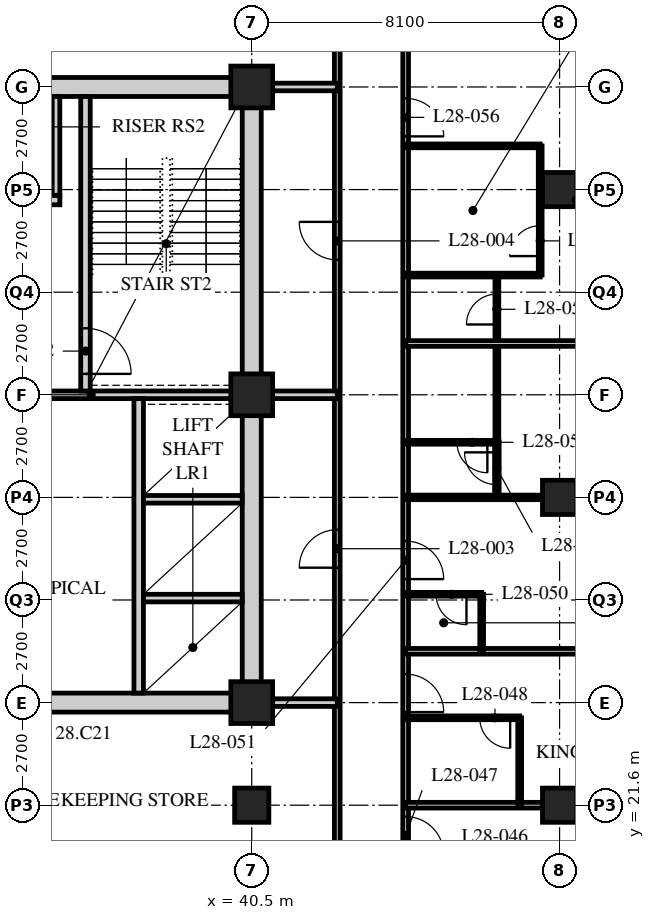
"""IFC4 building model, lengths in metres.
Left out: names, types, materials, properties, quantities, classifications, styles, units other than length and angle.
Written with IfcOpenShell. Run it as: python <this file> out.ifc"""

import sys

from ifc_helpers import new_model, si_unit, direction, frame, frame_2d, origin, origin_2d, place, context, subcontext, project, spatial, rectangle, hollow_rectangle, extrude, element, fill, save


model = new_model("IFC4")
c1 = context("Model", 3, precision=1e-05, world=origin(), true_north=direction((0.0, 1.0)))
c2 = subcontext(c1, "Body", "Model", "MODEL_VIEW")
j1 = project(units=[si_unit("LENGTHUNIT", "METRE"), si_unit("PLANEANGLEUNIT", "RADIAN")], contexts=[c1])
p1 = place(None, origin())
s1 = spatial("IfcSite", under=j1, at=p1, CompositionType="ELEMENT")
p2 = place(p1, origin())
s2 = spatial("IfcBuilding", under=s1, at=p2, CompositionType="ELEMENT")
p3 = place(p2, frame((0.0, 0.0, 113.6)))
s3 = spatial("IfcBuildingStorey", under=s2, at=p3, CompositionType="ELEMENT", Elevation=113.6)
p4 = place(p3, frame((40.5, 21.6, 0.0), z_axis=(0.0, 0.0, 1.0), x_axis=(1.0, 0.0, 0.0)))
e1 = element("IfcColumn", 1, at=p4, inside=s3, PredefinedType="COLUMN", context=c2, shape_type="SweptSolid", body=[
    extrude(hollow_rectangle(XDim=0.9, YDim=0.9, WallThickness=0.09, at=origin_2d()), origin(), (0.0, 0.0, 1.0), 3.4),
])
for number, where, z_axis, x_axis in (
    (2, (40.5, 24.3, 0.0), (0.0, 0.0, 1.0), (1.0, 0.0, 0.0)),
    (3, (40.5, 32.4, 0.0), (0.0, 0.0, 1.0), (1.0, 0.0, 0.0)),
    (4, (40.5, 40.5, 0.0), (0.0, 0.0, 1.0), (1.0, 0.0, 0.0)),
):
    element("IfcColumn", number, at=place(p3, frame(where, z_axis=z_axis, x_axis=x_axis)), inside=s3, PredefinedType="COLUMN", context=c2, shape_type="SweptSolid", body=[
        extrude(hollow_rectangle(XDim=1.1, YDim=1.1, WallThickness=0.1, at=origin_2d()), origin(), (0.0, 0.0, 1.0), 3.4),
    ])
for number, where, z_axis, x_axis in (
    (5, (48.6, 21.6, 0.0), (0.0, 0.0, 1.0), (1.0, 0.0, 0.0)),
    (6, (48.6, 29.7, 0.0), (0.0, 0.0, 1.0), (1.0, 0.0, 0.0)),
    (7, (48.6, 37.8, 0.0), (0.0, 0.0, 1.0), (1.0, 0.0, 0.0)),
):
    element("IfcColumn", number, at=place(p3, frame(where, z_axis=z_axis, x_axis=x_axis)), inside=s3, PredefinedType="COLUMN", context=c2, shape_type="SweptSolid", body=[
        extrude(hollow_rectangle(XDim=0.9, YDim=0.9, WallThickness=0.09, at=origin_2d()), origin(), (0.0, 0.0, 1.0), 3.4),
    ])
p5 = place(p3, frame((44.55, 17.55, 0.0), z_axis=(0.0, 0.0, 1.0), x_axis=(0.0, 1.0, 0.0)))
e8 = element("IfcWall", 8, at=p5, inside=s3, PredefinedType="PARTITIONING", context=c2, shape_type="SweptSolid", body=[
    extrude(rectangle(XDim=28.35, YDim=0.15, at=frame_2d((14.175, 0.0))), origin(), (0.0, 0.0, 1.0), 3.19),
])
p6 = place(p5, frame((2.75, 0.0, 0.0)))
e9 = element("IfcOpeningElement", 9, at=p6, cuts=e8, PredefinedType="OPENING", context=c2, shape_type="SweptSolid", body=[
    extrude(rectangle(XDim=1.0, YDim=2.1, at=frame_2d((0.5, 1.05))), frame((0.0, 0.085, 0.0), z_axis=(0.0, -1.0, 0.0), x_axis=(1.0, 0.0, 0.0)), (0.0, 0.0, 1.0), 0.17),
])
p7 = place(p5, frame((6.5, 0.0, 0.0)))
e10 = element("IfcOpeningElement", 10, at=p7, cuts=e8, PredefinedType="OPENING", context=c2, shape_type="SweptSolid", body=[
    extrude(rectangle(XDim=1.0, YDim=2.1, at=frame_2d((0.5, 1.05))), frame((0.0, 0.085, 0.0), z_axis=(0.0, -1.0, 0.0), x_axis=(1.0, 0.0, 0.0)), (0.0, 0.0, 1.0), 0.17),
])
p8 = place(p5, frame((10.0, 0.0, 0.0)))
e11 = element("IfcOpeningElement", 11, at=p8, cuts=e8, PredefinedType="OPENING", context=c2, shape_type="SweptSolid", body=[
    extrude(rectangle(XDim=1.0, YDim=2.1, at=frame_2d((0.5, 1.05))), frame((0.0, 0.085, 0.0), z_axis=(0.0, -1.0, 0.0), x_axis=(1.0, 0.0, 0.0)), (0.0, 0.0, 1.0), 0.17),
])
p9 = place(p5, frame((21.65, 0.0, 0.0)))
e12 = element("IfcOpeningElement", 12, at=p9, cuts=e8, PredefinedType="OPENING", context=c2, shape_type="SweptSolid", body=[
    extrude(rectangle(XDim=1.0, YDim=2.1, at=frame_2d((0.5, 1.05))), frame((0.0, 0.085, 0.0), z_axis=(0.0, -1.0, 0.0), x_axis=(1.0, 0.0, 0.0)), (0.0, 0.0, 1.0), 0.17),
])
p10 = place(p5, frame((26.75, 0.0, 0.0)))
e13 = element("IfcOpeningElement", 13, at=p10, cuts=e8, PredefinedType="OPENING", context=c2, shape_type="SweptSolid", body=[
    extrude(rectangle(XDim=1.0, YDim=2.1, at=frame_2d((0.5, 1.05))), frame((0.0, 0.085, 0.0), z_axis=(0.0, -1.0, 0.0), x_axis=(1.0, 0.0, 0.0)), (0.0, 0.0, 1.0), 0.17),
])
p11 = place(p3, frame((42.75, 19.35, 0.0), z_axis=(0.0, 0.0, 1.0), x_axis=(0.0, 1.0, 0.0)))
e14 = element("IfcWall", 14, at=p11, inside=s3, PredefinedType="PARTITIONING", context=c2, shape_type="SweptSolid", body=[
    extrude(rectangle(XDim=24.75, YDim=0.15, at=frame_2d((12.375, 0.0))), origin(), (0.0, 0.0, 1.0), 3.19),
])
p12 = place(p11, frame((8.5, 0.0, 0.0)))
e15 = element("IfcOpeningElement", 15, at=p12, cuts=e14, PredefinedType="OPENING", context=c2, shape_type="SweptSolid", body=[
    extrude(rectangle(XDim=1.0, YDim=2.1, at=frame_2d((0.5, 1.05))), frame((0.0, 0.085, 0.0), z_axis=(0.0, -1.0, 0.0), x_axis=(1.0, 0.0, 0.0)), (0.0, 0.0, 1.0), 0.17),
])
p13 = place(p11, frame((16.6, 0.0, 0.0)))
e16 = element("IfcOpeningElement", 16, at=p13, cuts=e14, PredefinedType="OPENING", context=c2, shape_type="SweptSolid", body=[
    extrude(rectangle(XDim=1.0, YDim=2.1, at=frame_2d((0.5, 1.05))), frame((0.0, 0.085, 0.0), z_axis=(0.0, -1.0, 0.0), x_axis=(1.0, 0.0, 0.0)), (0.0, 0.0, 1.0), 0.17),
])
for number, where, z_axis, x_axis in (
    (17, (40.5, 32.4, 0.0), (0.0, 0.0, 1.0), (1.0, 0.0, 0.0)),
    (18, (40.5, 24.3, 0.0), (0.0, 0.0, 1.0), (1.0, 0.0, 0.0)),
    (19, (40.5, 40.5, 0.0), (0.0, 0.0, 1.0), (1.0, 0.0, 0.0)),
):
    element("IfcWall", number, at=place(p3, frame(where, z_axis=z_axis, x_axis=x_axis)), inside=s3, PredefinedType="SOLIDWALL", context=c2, shape_type="SweptSolid", body=[
        extrude(rectangle(XDim=2.25, YDim=0.2, at=frame_2d((1.125, 0.0))), origin(), (0.0, 0.0, 1.0), 3.19),
    ])
p14 = place(p3, frame((44.55, 21.6, 0.0), z_axis=(0.0, 0.0, 1.0), x_axis=(1.0, 0.0, 0.0)))
e20 = element("IfcWall", 20, at=p14, inside=s3, PredefinedType="PARTITIONING", context=c2, shape_type="SweptSolid", body=[
    extrude(rectangle(XDim=11.85, YDim=0.15, at=frame_2d((5.925, 0.0))), origin(), (0.0, 0.0, 1.0), 2.578),
])
p15 = place(p3, frame((47.55, 21.6, 0.0), z_axis=(0.0, 0.0, 1.0), x_axis=(0.0, 1.0, 0.0)))
e21 = element("IfcWall", 21, at=p15, inside=s3, PredefinedType="PARTITIONING", context=c2, shape_type="SweptSolid", body=[
    extrude(rectangle(XDim=2.3, YDim=0.1, at=frame_2d((1.15, 0.0))), origin(), (0.0, 0.0, 1.0), 3.19),
])
p16 = place(p3, frame((44.55, 23.9, 0.0), z_axis=(0.0, 0.0, 1.0), x_axis=(1.0, 0.0, 0.0)))
e22 = element("IfcWall", 22, at=p16, inside=s3, PredefinedType="PARTITIONING", context=c2, shape_type="SweptSolid", body=[
    extrude(rectangle(XDim=3.0, YDim=0.1, at=frame_2d((1.5, 0.0))), origin(), (0.0, 0.0, 1.0), 3.19),
])
p17 = place(p16, frame((1.95, 0.0, 0.0)))
e23 = element("IfcOpeningElement", 23, at=p17, cuts=e22, PredefinedType="OPENING", context=c2, shape_type="SweptSolid", body=[
    extrude(rectangle(XDim=0.8, YDim=2.1, at=frame_2d((0.4, 1.05))), frame((0.0, 0.06, 0.0), z_axis=(0.0, -1.0, 0.0), x_axis=(1.0, 0.0, 0.0)), (0.0, 0.0, 1.0), 0.12),
])
p18 = place(p3, frame((44.55, 25.65, 0.0), z_axis=(0.0, 0.0, 1.0), x_axis=(1.0, 0.0, 0.0)))
e24 = element("IfcWall", 24, at=p18, inside=s3, PredefinedType="PARTITIONING", context=c2, shape_type="SweptSolid", body=[
    extrude(rectangle(XDim=11.85, YDim=0.15, at=frame_2d((5.925, 0.0))), origin(), (0.0, 0.0, 1.0), 3.19),
])
p19 = place(p3, frame((46.55, 25.65, 0.0), z_axis=(0.0, 0.0, 1.0), x_axis=(0.0, 1.0, 0.0)))
e25 = element("IfcWall", 25, at=p19, inside=s3, PredefinedType="PARTITIONING", context=c2, shape_type="SweptSolid", body=[
    extrude(rectangle(XDim=1.5, YDim=0.1, at=frame_2d((0.75, 0.0))), origin(), (0.0, 0.0, 1.0), 3.19),
])
p20 = place(p3, frame((44.55, 27.15, 0.0), z_axis=(0.0, 0.0, 1.0), x_axis=(1.0, 0.0, 0.0)))
e26 = element("IfcWall", 26, at=p20, inside=s3, PredefinedType="PARTITIONING", context=c2, shape_type="SweptSolid", body=[
    extrude(rectangle(XDim=2.0, YDim=0.1, at=frame_2d((1.0, 0.0))), origin(), (0.0, 0.0, 1.0), 3.19),
])
p21 = place(p20, frame((0.8, 0.0, 0.0)))
e27 = element("IfcOpeningElement", 27, at=p21, cuts=e26, PredefinedType="OPENING", context=c2, shape_type="SweptSolid", body=[
    extrude(rectangle(XDim=0.8, YDim=2.1, at=frame_2d((0.4, 1.05))), frame((0.0, 0.06, 0.0), z_axis=(0.0, -1.0, 0.0), x_axis=(1.0, 0.0, 0.0)), (0.0, 0.0, 1.0), 0.12),
])
p22 = place(p3, frame((46.95, 31.15, 0.0), z_axis=(0.0, 0.0, 1.0), x_axis=(0.0, 1.0, 0.0)))
e28 = element("IfcWall", 28, at=p22, inside=s3, PredefinedType="PARTITIONING", context=c2, shape_type="SweptSolid", body=[
    extrude(rectangle(XDim=4.4, YDim=0.1, at=frame_2d((2.2, 0.0))), origin(), (0.0, 0.0, 1.0), 3.19),
])
p23 = place(p22, frame((3.1, 0.0, 0.0)))
e29 = element("IfcOpeningElement", 29, at=p23, cuts=e28, PredefinedType="OPENING", context=c2, shape_type="SweptSolid", body=[
    extrude(rectangle(XDim=0.8, YDim=2.1, at=frame_2d((0.4, 1.05))), frame((0.0, 0.06, 0.0), z_axis=(0.0, -1.0, 0.0), x_axis=(1.0, 0.0, 0.0)), (0.0, 0.0, 1.0), 0.12),
])
p24 = place(p3, frame((44.55, 31.15, 0.0), z_axis=(0.0, 0.0, 1.0), x_axis=(1.0, 0.0, 0.0)))
e30 = element("IfcWall", 30, at=p24, inside=s3, PredefinedType="PARTITIONING", context=c2, shape_type="SweptSolid", body=[
    extrude(rectangle(XDim=2.4, YDim=0.1, at=frame_2d((1.2, 0.0))), origin(), (0.0, 0.0, 1.0), 3.19),
])
p25 = place(p24, frame((1.35, 0.0, 0.0)))
e31 = element("IfcOpeningElement", 31, at=p25, cuts=e30, PredefinedType="OPENING", context=c2, shape_type="SweptSolid", body=[
    extrude(rectangle(XDim=0.8, YDim=2.1, at=frame_2d((0.4, 1.05))), frame((0.0, 0.06, 0.0), z_axis=(0.0, -1.0, 0.0), x_axis=(1.0, 0.0, 0.0)), (0.0, 0.0, 1.0), 0.12),
])
p26 = place(p3, frame((44.55, 29.7, 0.0), z_axis=(0.0, 0.0, 1.0), x_axis=(1.0, 0.0, 0.0)))
e32 = element("IfcWall", 32, at=p26, inside=s3, PredefinedType="PARTITIONING", context=c2, shape_type="SweptSolid", body=[
    extrude(rectangle(XDim=11.85, YDim=0.12, at=frame_2d((5.925, 0.0))), origin(), (0.0, 0.0, 1.0), 2.578),
])
p27 = place(p26, frame((6.85, 0.0, 0.0)))
e33 = element("IfcOpeningElement", 33, at=p27, cuts=e32, PredefinedType="OPENING", context=c2, shape_type="SweptSolid", body=[
    extrude(rectangle(XDim=0.85, YDim=2.1, at=frame_2d((0.425, 1.05))), frame((0.0, 0.07, 0.0), z_axis=(0.0, -1.0, 0.0), x_axis=(1.0, 0.0, 0.0)), (0.0, 0.0, 1.0), 0.14),
])
p28 = place(p3, frame((44.55, 33.75, 0.0), z_axis=(0.0, 0.0, 1.0), x_axis=(1.0, 0.0, 0.0)))
e34 = element("IfcWall", 34, at=p28, inside=s3, PredefinedType="PARTITIONING", context=c2, shape_type="SweptSolid", body=[
    extrude(rectangle(XDim=11.85, YDim=0.15, at=frame_2d((5.925, 0.0))), origin(), (0.0, 0.0, 1.0), 3.19),
])
p29 = place(p3, frame((48.09, 35.55, 0.0), z_axis=(0.0, 0.0, 1.0), x_axis=(0.0, 1.0, 0.0)))
e35 = element("IfcWall", 35, at=p29, inside=s3, PredefinedType="PARTITIONING", context=c2, shape_type="SweptSolid", body=[
    extrude(rectangle(XDim=3.4, YDim=0.1, at=frame_2d((1.7, 0.0))), origin(), (0.0, 0.0, 1.0), 3.19),
])
p30 = place(p29, frame((0.5, 0.0, 0.0)))
e36 = element("IfcOpeningElement", 36, at=p30, cuts=e35, PredefinedType="OPENING", context=c2, shape_type="SweptSolid", body=[
    extrude(rectangle(XDim=0.8, YDim=2.1, at=frame_2d((0.4, 1.05))), frame((0.0, 0.06, 0.0), z_axis=(0.0, -1.0, 0.0), x_axis=(1.0, 0.0, 0.0)), (0.0, 0.0, 1.0), 0.12),
])
for number, where, z_axis, x_axis in (
    (37, (44.55, 35.55, 0.0), (0.0, 0.0, 1.0), (1.0, 0.0, 0.0)),
    (38, (44.55, 38.95, 0.0), (0.0, 0.0, 1.0), (1.0, 0.0, 0.0)),
):
    element("IfcWall", number, at=place(p3, frame(where, z_axis=z_axis, x_axis=x_axis)), inside=s3, PredefinedType="PARTITIONING", context=c2, shape_type="SweptSolid", body=[
        extrude(rectangle(XDim=3.54, YDim=0.1, at=frame_2d((1.77, 0.0))), origin(), (0.0, 0.0, 1.0), 3.19),
    ])
p31 = place(p3, frame((46.95, 31.16, 0.0), z_axis=(0.0, 0.0, 1.0), x_axis=(0.0, -1.0, 0.0)))
e39 = element("IfcWall", 39, at=p31, inside=s3, PredefinedType="PARTITIONING", context=c2, shape_type="SweptSolid", body=[
    extrude(rectangle(XDim=1.46, YDim=0.12, at=frame_2d((0.73, 0.0))), origin(), (0.0, 0.0, 1.0), 3.19),
])
p32 = place(p31, frame((0.275, 0.0, 0.0)))
e40 = element("IfcOpeningElement", 40, at=p32, cuts=e39, PredefinedType="OPENING", context=c2, shape_type="SweptSolid", body=[
    extrude(rectangle(XDim=0.85, YDim=2.1, at=frame_2d((0.425, 1.05))), frame((0.0, 0.07, 0.0), z_axis=(0.0, -1.0, 0.0), x_axis=(1.0, 0.0, 0.0)), (0.0, 0.0, 1.0), 0.14),
])
p33 = place(p3, frame((15.95, 24.3, 0.0), z_axis=(0.0, 0.0, 1.0), x_axis=(1.0, 0.0, 0.0)))
e41 = element("IfcWall", 41, at=p33, inside=s3, PredefinedType="SOLIDWALL", context=c2, shape_type="SweptSolid", body=[
    extrude(rectangle(XDim=24.8, YDim=0.5, at=frame_2d((12.4, 0.0))), origin(), (0.0, 0.0, 1.0), 2.54),
])
p34 = place(p33, frame((11.5, 0.0, 0.0)))
e42 = element("IfcOpeningElement", 42, at=p34, cuts=e41, PredefinedType="OPENING", context=c2, shape_type="SweptSolid", body=[
    extrude(rectangle(XDim=1.8, YDim=2.4, at=frame_2d((0.9, 1.2))), frame((0.0, 0.26, 0.0), z_axis=(0.0, -1.0, 0.0), x_axis=(1.0, 0.0, 0.0)), (0.0, 0.0, 1.0), 0.52),
])
p35 = place(p3, frame((15.95, 40.5, 0.0), z_axis=(0.0, 0.0, 1.0), x_axis=(1.0, 0.0, 0.0)))
e43 = element("IfcWall", 43, at=p35, inside=s3, PredefinedType="SOLIDWALL", context=c2, shape_type="SweptSolid", body=[
    extrude(rectangle(XDim=24.8, YDim=0.5, at=frame_2d((12.4, 0.0))), origin(), (0.0, 0.0, 1.0), 2.54),
])
p36 = place(p35, frame((11.5, 0.0, 0.0)))
e44 = element("IfcOpeningElement", 44, at=p36, cuts=e43, PredefinedType="OPENING", context=c2, shape_type="SweptSolid", body=[
    extrude(rectangle(XDim=1.8, YDim=2.4, at=frame_2d((0.9, 1.2))), frame((0.0, 0.26, 0.0), z_axis=(0.0, -1.0, 0.0), x_axis=(1.0, 0.0, 0.0)), (0.0, 0.0, 1.0), 0.52),
])
p37 = place(p3, frame((40.5, 24.55, 0.0), z_axis=(0.0, 0.0, 1.0), x_axis=(0.0, 1.0, 0.0)))
e45 = element("IfcWall", 45, at=p37, inside=s3, PredefinedType="SOLIDWALL", context=c2, shape_type="SweptSolid", body=[
    extrude(rectangle(XDim=15.7, YDim=0.5, at=frame_2d((7.85, 0.0))), origin(), (0.0, 0.0, 1.0), 2.578),
])
p38 = place(p3, frame((32.3, 32.4, 0.0), z_axis=(0.0, 0.0, 1.0), x_axis=(1.0, 0.0, 0.0)))
e46 = element("IfcWall", 46, at=p38, inside=s3, PredefinedType="SOLIDWALL", context=c2, shape_type="SweptSolid", body=[
    extrude(rectangle(XDim=7.95, YDim=0.2, at=frame_2d((3.975, 0.0))), origin(), (0.0, 0.0, 1.0), 2.578),
])
p39 = place(p3, frame((37.525, 24.55, 0.0), z_axis=(0.0, 0.0, 1.0), x_axis=(0.0, 1.0, 0.0)))
e47 = element("IfcWall", 47, at=p39, inside=s3, PredefinedType="SOLIDWALL", context=c2, shape_type="SweptSolid", body=[
    extrude(rectangle(XDim=7.75, YDim=0.25, at=frame_2d((3.875, 0.0))), origin(), (0.0, 0.0, 1.0), 3.19),
])
for number, where, z_axis, x_axis in (
    (48, (37.65, 27.05, 0.0), (0.0, 0.0, 1.0), (1.0, 0.0, 0.0)),
    (49, (37.65, 29.65, 0.0), (0.0, 0.0, 1.0), (1.0, 0.0, 0.0)),
):
    element("IfcWall", number, at=place(p3, frame(where, z_axis=z_axis, x_axis=x_axis)), inside=s3, PredefinedType="SOLIDWALL", context=c2, shape_type="SweptSolid", body=[
        extrude(rectangle(XDim=2.6, YDim=0.2, at=frame_2d((1.3, 0.0))), origin(), (0.0, 0.0, 1.0), 3.19),
    ])
p40 = place(p3, frame((36.125, 32.5, 0.0), z_axis=(0.0, 0.0, 1.0), x_axis=(0.0, 1.0, 0.0)))
e50 = element("IfcWall", 50, at=p40, inside=s3, PredefinedType="SOLIDWALL", context=c2, shape_type="SweptSolid", body=[
    extrude(rectangle(XDim=7.75, YDim=0.25, at=frame_2d((3.875, 0.0))), origin(), (0.0, 0.0, 1.0), 3.19),
])
p41 = place(p40, frame((0.45, 0.0, 0.0)))
e51 = element("IfcOpeningElement", 51, at=p41, cuts=e50, PredefinedType="OPENING", context=c2, shape_type="SweptSolid", body=[
    extrude(rectangle(XDim=1.2, YDim=2.1, at=frame_2d((0.6, 1.05))), frame((0.0, 0.135, 0.0), z_axis=(0.0, -1.0, 0.0), x_axis=(1.0, 0.0, 0.0)), (0.0, 0.0, 1.0), 0.27),
])
p42 = place(p3, frame((32.5, 37.525, 0.0), z_axis=(0.0, 0.0, 1.0), x_axis=(1.0, 0.0, 0.0)))
e52 = element("IfcWall", 52, at=p42, inside=s3, PredefinedType="SOLIDWALL", context=c2, shape_type="SweptSolid", body=[
    extrude(rectangle(XDim=2.95, YDim=0.25, at=frame_2d((1.475, 0.0))), origin(), (0.0, 0.0, 1.0), 3.19),
])
p43 = place(p42, frame((0.9, 0.0, 0.0)))
e53 = element("IfcOpeningElement", 53, at=p43, cuts=e52, PredefinedType="OPENING", context=c2, shape_type="SweptSolid", body=[
    extrude(rectangle(XDim=1.1, YDim=2.4, at=frame_2d((0.55, 1.2))), frame((0.0, 0.135, 0.0), z_axis=(0.0, -1.0, 0.0), x_axis=(1.0, 0.0, 0.0)), (0.0, 0.0, 1.0), 0.27),
])
p44 = place(p3, frame((35.35, 37.65, 0.0), z_axis=(0.0, 0.0, 1.0), x_axis=(0.0, 1.0, 0.0)))
e54 = element("IfcWall", 54, at=p44, inside=s3, PredefinedType="SOLIDWALL", context=c2, shape_type="SweptSolid", body=[
    extrude(rectangle(XDim=2.6, YDim=0.2, at=frame_2d((1.3, 0.0))), origin(), (0.0, 0.0, 1.0), 3.19),
])
p45 = place(p12, origin())
e55 = element("IfcDoor", 55, at=p45, inside=s3, OperationType="SINGLE_SWING_LEFT", PredefinedType="DOOR", context=c2, shape_type="SweptSolid", body=[
    extrude(rectangle(XDim=1.0, YDim=2.1, at=frame_2d((0.5, 1.05))), frame((0.0, 0.025, 0.0), z_axis=(0.0, -1.0, 0.0), x_axis=(1.0, 0.0, 0.0)), (0.0, 0.0, 1.0), 0.05),
])
fill(e15, e55)
p46 = place(p13, origin())
e56 = element("IfcDoor", 56, at=p46, inside=s3, OperationType="SINGLE_SWING_RIGHT", PredefinedType="DOOR", context=c2, shape_type="SweptSolid", body=[
    extrude(rectangle(XDim=1.0, YDim=2.1, at=frame_2d((0.5, 1.05))), frame((0.0, 0.025, 0.0), z_axis=(0.0, -1.0, 0.0), x_axis=(1.0, 0.0, 0.0)), (0.0, 0.0, 1.0), 0.05),
])
fill(e16, e56)
p47 = place(p6, origin())
e57 = element("IfcDoor", 57, at=p47, inside=s3, OperationType="SINGLE_SWING_RIGHT", PredefinedType="DOOR", context=c2, shape_type="SweptSolid", body=[
    extrude(rectangle(XDim=1.0, YDim=2.1, at=frame_2d((0.5, 1.05))), frame((0.0, 0.025, 0.0), z_axis=(0.0, -1.0, 0.0), x_axis=(1.0, 0.0, 0.0)), (0.0, 0.0, 1.0), 0.05),
])
fill(e9, e57)
p48 = place(p17, origin())
e58 = element("IfcDoor", 58, at=p48, inside=s3, OperationType="SINGLE_SWING_LEFT", PredefinedType="DOOR", context=c2, shape_type="SweptSolid", body=[
    extrude(rectangle(XDim=0.8, YDim=2.1, at=frame_2d((0.4, 1.05))), frame((0.0, 0.025, 0.0), z_axis=(0.0, -1.0, 0.0), x_axis=(1.0, 0.0, 0.0)), (0.0, 0.0, 1.0), 0.05),
])
fill(e23, e58)
p49 = place(p7, origin())
e59 = element("IfcDoor", 59, at=p49, inside=s3, OperationType="SINGLE_SWING_RIGHT", PredefinedType="DOOR", context=c2, shape_type="SweptSolid", body=[
    extrude(rectangle(XDim=1.0, YDim=2.1, at=frame_2d((0.5, 1.05))), frame((0.0, 0.025, 0.0), z_axis=(0.0, -1.0, 0.0), x_axis=(1.0, 0.0, 0.0)), (0.0, 0.0, 1.0), 0.05),
])
fill(e10, e59)
p50 = place(p21, origin())
e60 = element("IfcDoor", 60, at=p50, inside=s3, OperationType="SINGLE_SWING_LEFT", PredefinedType="DOOR", context=c2, shape_type="SweptSolid", body=[
    extrude(rectangle(XDim=0.8, YDim=2.1, at=frame_2d((0.4, 1.05))), frame((0.0, 0.025, 0.0), z_axis=(0.0, -1.0, 0.0), x_axis=(1.0, 0.0, 0.0)), (0.0, 0.0, 1.0), 0.05),
])
fill(e27, e60)
p51 = place(p8, origin())
e61 = element("IfcDoor", 61, at=p51, inside=s3, OperationType="SINGLE_SWING_RIGHT", PredefinedType="DOOR", context=c2, shape_type="SweptSolid", body=[
    extrude(rectangle(XDim=1.0, YDim=2.1, at=frame_2d((0.5, 1.05))), frame((0.0, 0.025, 0.0), z_axis=(0.0, -1.0, 0.0), x_axis=(1.0, 0.0, 0.0)), (0.0, 0.0, 1.0), 0.05),
])
fill(e11, e61)
p52 = place(p25, origin())
e62 = element("IfcDoor", 62, at=p52, inside=s3, OperationType="SINGLE_SWING_LEFT", PredefinedType="DOOR", context=c2, shape_type="SweptSolid", body=[
    extrude(rectangle(XDim=0.8, YDim=2.1, at=frame_2d((0.4, 1.05))), frame((0.0, 0.025, 0.0), z_axis=(0.0, -1.0, 0.0), x_axis=(1.0, 0.0, 0.0)), (0.0, 0.0, 1.0), 0.05),
])
fill(e31, e62)
p53 = place(p30, origin())
e63 = element("IfcDoor", 63, at=p53, inside=s3, OperationType="SINGLE_SWING_LEFT", PredefinedType="DOOR", context=c2, shape_type="SweptSolid", body=[
    extrude(rectangle(XDim=0.8, YDim=2.1, at=frame_2d((0.4, 1.05))), frame((0.0, 0.025, 0.0), z_axis=(0.0, -1.0, 0.0), x_axis=(1.0, 0.0, 0.0)), (0.0, 0.0, 1.0), 0.05),
])
fill(e36, e63)
p54 = place(p23, origin())
e64 = element("IfcDoor", 64, at=p54, inside=s3, OperationType="SINGLE_SWING_LEFT", PredefinedType="DOOR", context=c2, shape_type="SweptSolid", body=[
    extrude(rectangle(XDim=0.8, YDim=2.1, at=frame_2d((0.4, 1.05))), frame((0.0, 0.025, 0.0), z_axis=(0.0, -1.0, 0.0), x_axis=(1.0, 0.0, 0.0)), (0.0, 0.0, 1.0), 0.05),
])
fill(e29, e64)
p55 = place(p9, origin())
e65 = element("IfcDoor", 65, at=p55, inside=s3, OperationType="SINGLE_SWING_RIGHT", PredefinedType="DOOR", context=c2, shape_type="SweptSolid", body=[
    extrude(rectangle(XDim=1.0, YDim=2.1, at=frame_2d((0.5, 1.05))), frame((0.0, 0.025, 0.0), z_axis=(0.0, -1.0, 0.0), x_axis=(1.0, 0.0, 0.0)), (0.0, 0.0, 1.0), 0.05),
])
fill(e12, e65)
p56 = place(p32, origin())
e66 = element("IfcDoor", 66, at=p56, inside=s3, OperationType="SINGLE_SWING_RIGHT", PredefinedType="DOOR", context=c2, shape_type="SweptSolid", body=[
    extrude(rectangle(XDim=0.85, YDim=2.1, at=frame_2d((0.425, 1.05))), frame((0.0, 0.025, 0.0), z_axis=(0.0, -1.0, 0.0), x_axis=(1.0, 0.0, 0.0)), (0.0, 0.0, 1.0), 0.05),
])
fill(e40, e66)
p57 = place(p41, origin())
e67 = element("IfcDoor", 67, at=p57, inside=s3, OperationType="SINGLE_SWING_RIGHT", PredefinedType="DOOR", context=c2, shape_type="SweptSolid", body=[
    extrude(rectangle(XDim=1.2, YDim=2.1, at=frame_2d((0.6, 1.05))), frame((0.0, 0.025, 0.0), z_axis=(0.0, -1.0, 0.0), x_axis=(1.0, 0.0, 0.0)), (0.0, 0.0, 1.0), 0.05),
])
fill(e51, e67)
save(model, sys.argv[1])
